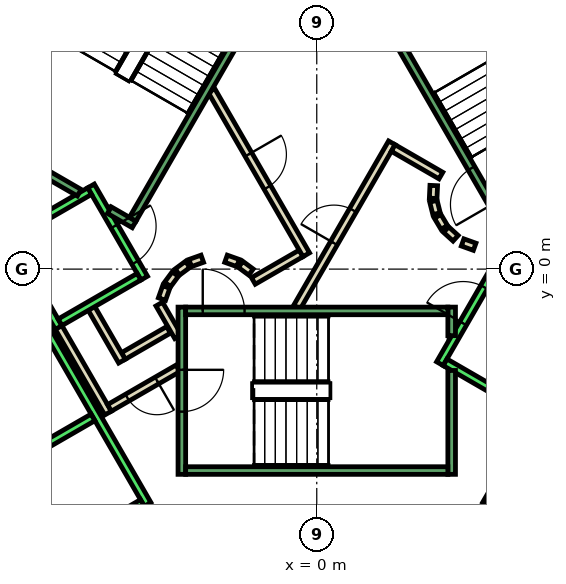
"""IFC4 building model, lengths in metres.
Left out: names, types, materials, properties, quantities, classifications, styles, units other than length and angle.
Written with IfcOpenShell. Run it as: python <this file> out.ifc"""

import sys

from ifc_helpers import new_model, si_unit, direction, frame, frame_2d, origin, place, context, subcontext, project, spatial, polyline, rectangle, outline, extrude, element, fill, save


model = new_model("IFC4")
c1 = context("Model", 3, precision=1e-05, world=origin(), true_north=direction((0.0, 1.0)))
c2 = subcontext(c1, "Body", "Model", "MODEL_VIEW")
j1 = project(units=[si_unit("LENGTHUNIT", "METRE"), si_unit("PLANEANGLEUNIT", "RADIAN")], contexts=[c1])
p1 = place(None, origin())
s1 = spatial("IfcSite", under=j1, at=p1, CompositionType="ELEMENT")
p2 = place(p1, origin())
s2 = spatial("IfcBuilding", under=s1, at=p2, CompositionType="ELEMENT")
p3 = place(p2, frame((0.0, 0.0, 81.2)))
s3 = spatial("IfcBuildingStorey", under=s2, at=p3, CompositionType="ELEMENT", Elevation=81.2)
p4 = place(p3, frame((0.0, 0.0, -0.6)))
e1 = element("IfcWall", 1, at=p4, inside=s3, PredefinedType="SHEAR", context=c2, shape_type="SweptSolid", body=[
    extrude(outline(polyline([(-12.267, 5.252), (-11.488, 4.802), (-6.409, 13.6), (-6.928, 14.5), (-12.267, 5.252)])), origin(), (0.0, 0.0, 1.0), 5.4),
])
p5 = place(p3, frame((0.0, 0.0, -0.6)))
e2 = element("IfcWall", 2, at=p5, inside=s3, PredefinedType="SHEAR", context=c2, shape_type="SweptSolid", body=[
    extrude(outline(polyline([(-13.856, 2.5), (-6.928, -9.5), (-6.409, -8.6), (-12.817, 2.5), (-13.856, 2.5)])), origin(), (0.0, 0.0, 1.0), 5.4),
])
p6 = place(p3, frame((-3.9, -1.599, 0.0), z_axis=(0.0, 0.0, 1.0), x_axis=(-0.865969445389, -0.500096910261, 0.0)))
e3 = element("IfcWall", 3, at=p6, inside=s3, PredefinedType="PARTITIONING", context=c2, shape_type="SweptSolid", body=[
    extrude(rectangle(XDim=1.373, YDim=0.2, at=frame_2d((0.687, 0.0))), origin(), (0.0, 0.0, 1.0), 4.8),
])
p7 = place(p3, frame((-5.126, -2.422, 0.0), z_axis=(0.0, 0.0, 1.0), x_axis=(-0.500062241894, 0.865989465428, 0.0)))
e4 = element("IfcWall", 4, at=p7, inside=s3, PredefinedType="PARTITIONING", context=c2, shape_type="SweptSolid", body=[
    extrude(rectangle(XDim=1.7, YDim=0.2, at=frame_2d((0.85, 0.0))), origin(), (0.0, 0.0, 1.0), 4.8),
])
p8 = place(p3, frame((-5.492, -3.788, 0.0), z_axis=(0.0, 0.0, 1.0), x_axis=(-0.500008949224, 0.866020236886, 0.0)))
e5 = element("IfcWall", 5, at=p8, inside=s3, PredefinedType="PARTITIONING", context=c2, shape_type="SweptSolid", body=[
    extrude(rectangle(XDim=2.68, YDim=0.2, at=frame_2d((1.34, 0.0))), origin(), (0.0, 0.0, 1.0), 4.8),
])
p9 = place(p3, frame((-4.145, -0.92, 0.0), z_axis=(0.0, 0.0, 1.0), x_axis=(0.499743786207, -0.866173278362, 0.0)))
e6 = element("IfcWall", 6, at=p9, inside=s3, PredefinedType="PARTITIONING", context=c2, shape_type="SweptSolid", body=[
    extrude(rectangle(XDim=0.991, YDim=0.2, at=frame_2d((0.495, 0.0))), origin(), (0.0, 0.0, 1.0), 4.8),
])
p10 = place(p3, frame((-3.65, -2.61, 0.0), z_axis=(0.0, 0.0, 1.0), x_axis=(-0.866072462134, -0.499918483688, 0.0)))
e7 = element("IfcWall", 7, at=p10, inside=s3, PredefinedType="PARTITIONING", context=c2, shape_type="SweptSolid", body=[
    extrude(rectangle(XDim=2.084, YDim=0.2, at=frame_2d((1.042, 0.0))), origin(), (0.0, 0.0, 1.0), 4.8),
])
p11 = place(p10, frame((0.642, 0.0, 0.0)))
e8 = element("IfcOpeningElement", 8, at=p11, cuts=e7, PredefinedType="OPENING", context=c2, shape_type="SweptSolid", body=[
    extrude(rectangle(XDim=0.9, YDim=2.1, at=frame_2d((0.45, 1.05))), frame((0.0, 0.11, 0.0), z_axis=(0.0, -1.0, 0.0), x_axis=(1.0, 0.0, 0.0)), (0.0, 0.0, 1.0), 0.22),
])
p12 = place(p3, frame((3.079, 2.199, 0.0), z_axis=(0.0, 0.0, 1.0), x_axis=(-0.047771483479, -0.998858290933, 0.0)))
e9 = element("IfcWall", 9, at=p12, inside=s3, PredefinedType="PARTITIONING", context=c2, shape_type="SweptSolid", body=[
    extrude(rectangle(XDim=0.337, YDim=0.2, at=frame_2d((0.169, 0.0))), origin(), (0.0, 0.0, 1.0), 4.8),
])
p13 = place(p3, frame((3.07, 1.786, 0.0), z_axis=(0.0, 0.0, 1.0), x_axis=(0.242705583207, -0.970099994784, 0.0)))
e10 = element("IfcWall", 10, at=p13, inside=s3, PredefinedType="PARTITIONING", context=c2, shape_type="SweptSolid", body=[
    extrude(rectangle(XDim=0.338, YDim=0.2, at=frame_2d((0.169, 0.0))), origin(), (0.0, 0.0, 1.0), 4.8),
])
for number, where, z_axis, x_axis in (
    (11, (3.182, 1.388, 0.0), (0.0, 0.0, 1.0), (0.512, -0.859, 0.0)),
    (12, (3.404, 1.039, 0.0), (0.0, 0.0, 1.0), (0.74, -0.672, 0.0)),
):
    element("IfcWall", number, at=place(p3, frame(where, z_axis=z_axis, x_axis=x_axis)), inside=s3, PredefinedType="PARTITIONING", context=c2, shape_type="SweptSolid", body=[
        extrude(rectangle(XDim=0.338, YDim=0.2, at=frame_2d((0.169, 0.0))), origin(), (0.0, 0.0, 1.0), 4.8),
    ])
p14 = place(p3, frame((3.838, 0.702, 0.0), z_axis=(0.0, 0.0, 1.0), x_axis=(0.941035081519, -0.338308993895, 0.0)))
e13 = element("IfcWall", 13, at=p14, inside=s3, PredefinedType="PARTITIONING", context=c2, shape_type="SweptSolid", body=[
    extrude(rectangle(XDim=0.337, YDim=0.2, at=frame_2d((0.168, 0.0))), origin(), (0.0, 0.0, 1.0), 4.8),
])
p15 = place(p3, frame((-0.52, -1.0, 0.0), z_axis=(0.0, 0.0, 1.0), x_axis=(0.50011622646, 0.865958290007, 0.0)))
e14 = element("IfcWall", 14, at=p15, inside=s3, PredefinedType="PARTITIONING", context=c2, shape_type="SweptSolid", body=[
    extrude(rectangle(XDim=4.991, YDim=0.2, at=frame_2d((2.496, 0.0))), origin(), (0.0, 0.0, 1.0), 4.8),
])
p16 = place(p15, frame((1.945, 0.0, 0.0)))
e15 = element("IfcOpeningElement", 15, at=p16, cuts=e14, PredefinedType="OPENING", context=c2, shape_type="SweptSolid", body=[
    extrude(rectangle(XDim=1.0, YDim=2.1, at=frame_2d((0.5, 1.05))), frame((0.0, 0.11, 0.0), z_axis=(0.0, -1.0, 0.0), x_axis=(1.0, 0.0, 0.0)), (0.0, 0.0, 1.0), 0.22),
])
p17 = place(p3, frame((2.012, 3.186, 0.0), z_axis=(0.0, 0.0, 1.0), x_axis=(0.865891012941, -0.500232699559, 0.0)))
e16 = element("IfcWall", 16, at=p17, inside=s3, PredefinedType="PARTITIONING", context=c2, shape_type="SweptSolid", body=[
    extrude(rectangle(XDim=1.449, YDim=0.2, at=frame_2d((0.725, 0.0))), origin(), (0.0, 0.0, 1.0), 4.8),
])
p18 = place(p3, frame((-0.412, 0.414, 0.0), z_axis=(0.0, 0.0, 1.0), x_axis=(-0.866017369001, -0.500013916395, 0.0)))
e17 = element("IfcWall", 17, at=p18, inside=s3, PredefinedType="PARTITIONING", context=c2, shape_type="SweptSolid", body=[
    extrude(rectangle(XDim=1.45, YDim=0.2, at=frame_2d((0.725, 0.0))), origin(), (0.0, 0.0, 1.0), 4.8),
])
p19 = place(p3, frame((-1.731, -0.077, 0.0), z_axis=(0.0, 0.0, 1.0), x_axis=(-0.804311165252, 0.594208338422, 0.0)))
e18 = element("IfcWall", 18, at=p19, inside=s3, PredefinedType="PARTITIONING", context=c2, shape_type="SweptSolid", body=[
    extrude(rectangle(XDim=0.338, YDim=0.2, at=frame_2d((0.169, 0.0))), origin(), (0.0, 0.0, 1.0), 4.8),
])
p20 = place(p3, frame((-2.07, 0.16, 0.0), z_axis=(0.0, 0.0, 1.0), x_axis=(-0.942199461132, 0.335052496547, 0.0)))
e19 = element("IfcWall", 19, at=p20, inside=s3, PredefinedType="PARTITIONING", context=c2, shape_type="SweptSolid", body=[
    extrude(rectangle(XDim=0.337, YDim=0.2, at=frame_2d((0.169, 0.0))), origin(), (0.0, 0.0, 1.0), 4.8),
])
p21 = place(p3, frame((-3.012, 0.273, 0.0), z_axis=(0.0, 0.0, 1.0), x_axis=(-0.942280615813, -0.334824194261, 0.0)))
e20 = element("IfcWall", 20, at=p21, inside=s3, PredefinedType="PARTITIONING", context=c2, shape_type="SweptSolid", body=[
    extrude(rectangle(XDim=0.338, YDim=0.2, at=frame_2d((0.169, 0.0))), origin(), (0.0, 0.0, 1.0), 4.8),
])
p22 = place(p3, frame((-3.397, 0.124, 0.0), z_axis=(0.0, 0.0, 1.0), x_axis=(-0.804311165252, -0.594208338422, 0.0)))
e21 = element("IfcWall", 21, at=p22, inside=s3, PredefinedType="PARTITIONING", context=c2, shape_type="SweptSolid", body=[
    extrude(rectangle(XDim=0.338, YDim=0.2, at=frame_2d((0.169, 0.0))), origin(), (0.0, 0.0, 1.0), 4.8),
])
p23 = place(p3, frame((-3.723, -0.131, 0.0), z_axis=(0.0, 0.0, 1.0), x_axis=(-0.594675113454, -0.803966112121, 0.0)))
e22 = element("IfcWall", 22, at=p23, inside=s3, PredefinedType="PARTITIONING", context=c2, shape_type="SweptSolid", body=[
    extrude(rectangle(XDim=0.338, YDim=0.2, at=frame_2d((0.169, 0.0))), origin(), (0.0, 0.0, 1.0), 4.8),
])
p24 = place(p3, frame((-3.96, -0.47, 0.0), z_axis=(0.0, 0.0, 1.0), x_axis=(-0.334824194261, -0.942280615813, 0.0)))
e23 = element("IfcWall", 23, at=p24, inside=s3, PredefinedType="PARTITIONING", context=c2, shape_type="SweptSolid", body=[
    extrude(rectangle(XDim=0.338, YDim=0.2, at=frame_2d((0.169, 0.0))), origin(), (0.0, 0.0, 1.0), 4.8),
])
p25 = place(p3, frame((-2.771, 4.7, 0.0), z_axis=(0.0, 0.0, 1.0), x_axis=(0.499969479948, -0.866043023828, 0.0)))
e24 = element("IfcWall", 24, at=p25, inside=s3, PredefinedType="PARTITIONING", context=c2, shape_type="SweptSolid", body=[
    extrude(rectangle(XDim=4.99, YDim=0.2, at=frame_2d((2.495, 0.0))), origin(), (0.0, 0.0, 1.0), 4.8),
])
p26 = place(p25, frame((1.945, 0.0, 0.0)))
e25 = element("IfcOpeningElement", 25, at=p26, cuts=e24, PredefinedType="OPENING", context=c2, shape_type="SweptSolid", body=[
    extrude(rectangle(XDim=1.0, YDim=2.1, at=frame_2d((0.5, 1.05))), frame((0.0, 0.11, 0.0), z_axis=(0.0, -1.0, 0.0), x_axis=(1.0, 0.0, 0.0)), (0.0, 0.0, 1.0), 0.22),
])
p27 = place(p3, frame((-5.94, 2.188, 0.0), z_axis=(0.0, 0.0, 1.0), x_axis=(0.49994636267, -0.866056369097, 0.0)))
e26 = element("IfcWall", 26, at=p27, inside=s3, PredefinedType="STANDARD", context=c2, shape_type="SweptSolid", body=[
    extrude(rectangle(XDim=2.8, YDim=0.2, at=frame_2d((1.4, 0.0))), origin(), (0.0, 0.0, 1.0), 4.8),
])
p28 = place(p27, frame((1.225, 0.0, 0.0)))
e27 = element("IfcOpeningElement", 27, at=p28, cuts=e26, PredefinedType="OPENING", context=c2, shape_type="SweptSolid", body=[
    extrude(rectangle(XDim=1.1, YDim=2.1, at=frame_2d((0.55, 1.05))), frame((0.0, 0.11, 0.0), z_axis=(0.0, -1.0, 0.0), x_axis=(1.0, 0.0, 0.0)), (0.0, 0.0, 1.0), 0.22),
])
p29 = place(p3, frame((-8.192, 0.888, 0.0), z_axis=(0.0, 0.0, 1.0), x_axis=(0.49994636267, -0.866056369097, 0.0)))
e28 = element("IfcWall", 28, at=p29, inside=s3, PredefinedType="STANDARD", context=c2, shape_type="SweptSolid", body=[
    extrude(rectangle(XDim=2.8, YDim=0.2, at=frame_2d((1.4, 0.0))), origin(), (0.0, 0.0, 1.0), 4.8),
])
for number, where, z_axis, x_axis in (
    (29, (-5.977, 2.052, 0.0), (0.0, 0.0, 1.0), (-0.866, -0.5, 0.0)),
    (30, (-4.677, -0.2, 0.0), (0.0, 0.0, 1.0), (-0.866, -0.5, 0.0)),
):
    element("IfcWall", number, at=place(p3, frame(where, z_axis=z_axis, x_axis=x_axis)), inside=s3, PredefinedType="STANDARD", context=c2, shape_type="SweptSolid", body=[
        extrude(rectangle(XDim=2.399, YDim=0.2, at=frame_2d((1.2, 0.0))), origin(), (0.0, 0.0, 1.0), 4.8),
    ])
p30 = place(p3, frame((-9.751, 2.99, 0.0), z_axis=(0.0, 0.0, 1.0), x_axis=(0.50000090737, -0.866024879913, 0.0)))
e31 = element("IfcWall", 31, at=p30, inside=s3, PredefinedType="STANDARD", context=c2, shape_type="SweptSolid", body=[
    extrude(rectangle(XDim=10.6, YDim=0.2, at=frame_2d((5.3, 0.0))), origin(), (0.0, 0.0, 1.0), 4.8),
])
for number, where, z_axis, x_axis in (
    (32, (-5.888, -3.902, 0.0), (0.0, 0.0, 1.0), (-0.866, -0.5, 0.0)),
    (33, (-4.588, -6.153, 0.0), (0.0, 0.0, 1.0), (-0.866, -0.5, 0.0)),
):
    element("IfcWall", number, at=place(p3, frame(where, z_axis=z_axis, x_axis=x_axis)), inside=s3, PredefinedType="STANDARD", context=c2, shape_type="SweptSolid", body=[
        extrude(rectangle(XDim=2.5, YDim=0.2, at=frame_2d((1.25, 0.0))), origin(), (0.0, 0.0, 1.0), 4.8),
    ])
p31 = place(p3, frame((3.24, -2.488, 0.0), z_axis=(0.0, 0.0, 1.0), x_axis=(0.49994636267, 0.866056369097, 0.0)))
e34 = element("IfcWall", 34, at=p31, inside=s3, PredefinedType="STANDARD", context=c2, shape_type="SweptSolid", body=[
    extrude(rectangle(XDim=2.8, YDim=0.2, at=frame_2d((1.4, 0.0))), origin(), (0.0, 0.0, 1.0), 4.8),
])
p32 = place(p31, frame((1.225, 0.0, 0.0)))
e35 = element("IfcOpeningElement", 35, at=p32, cuts=e34, PredefinedType="OPENING", context=c2, shape_type="SweptSolid", body=[
    extrude(rectangle(XDim=1.1, YDim=2.1, at=frame_2d((0.55, 1.05))), frame((0.0, 0.11, 0.0), z_axis=(0.0, -1.0, 0.0), x_axis=(1.0, 0.0, 0.0)), (0.0, 0.0, 1.0), 0.22),
])
p33 = place(p3, frame((3.377, -2.452, 0.0), z_axis=(0.0, 0.0, 1.0), x_axis=(0.865955154139, -0.50012165622, 0.0)))
e36 = element("IfcWall", 36, at=p33, inside=s3, PredefinedType="STANDARD", context=c2, shape_type="SweptSolid", body=[
    extrude(rectangle(XDim=2.4, YDim=0.2, at=frame_2d((1.2, 0.0))), origin(), (0.0, 0.0, 1.0), 4.8),
])
p34 = place(p3, frame((4.451, -6.19, 0.0), z_axis=(0.0, 0.0, 1.0), x_axis=(0.50000090737, 0.866024879913, 0.0)))
e37 = element("IfcWall", 37, at=p34, inside=s3, PredefinedType="STANDARD", context=c2, shape_type="SweptSolid", body=[
    extrude(rectangle(XDim=10.6, YDim=0.2, at=frame_2d((5.3, 0.0))), origin(), (0.0, 0.0, 1.0), 4.8),
])
p35 = place(p3, frame((-3.55, -1.0, 0.0), z_axis=(0.0, 0.0, 1.0), x_axis=(0.0, -1.0, 0.0)))
e38 = element("IfcWall", 38, at=p35, inside=s3, PredefinedType="STANDARD", context=c2, shape_type="SweptSolid", body=[
    extrude(rectangle(XDim=4.4, YDim=0.2, at=frame_2d((2.2, 0.0))), origin(), (0.0, 0.0, 1.0), 4.8),
])
p36 = place(p35, frame((1.65, 0.0, 0.0)))
e39 = element("IfcOpeningElement", 39, at=p36, cuts=e38, PredefinedType="OPENING", context=c2, shape_type="SweptSolid", body=[
    extrude(rectangle(XDim=1.1, YDim=2.2, at=frame_2d((0.55, 1.1))), frame((0.0, 0.11, 0.0), z_axis=(0.0, -1.0, 0.0), x_axis=(1.0, 0.0, 0.0)), (0.0, 0.0, 1.0), 0.22),
])
p37 = place(p3, frame((3.55, -2.667, 0.0), z_axis=(0.0, 0.0, 1.0), x_axis=(0.0, -1.0, 0.0)))
e40 = element("IfcWall", 40, at=p37, inside=s3, PredefinedType="STANDARD", context=c2, shape_type="SweptSolid", body=[
    extrude(rectangle(XDim=2.733, YDim=0.2, at=frame_2d((1.366, 0.0))), origin(), (0.0, 0.0, 1.0), 4.8),
])
p38 = place(p3, frame((3.55, -1.0, 0.0), z_axis=(0.0, 0.0, 1.0), x_axis=(0.0, -1.0, 0.0)))
e41 = element("IfcWall", 41, at=p38, inside=s3, PredefinedType="STANDARD", context=c2, shape_type="SweptSolid", body=[
    extrude(rectangle(XDim=0.751, YDim=0.2, at=frame_2d((0.375, 0.0))), origin(), (0.0, 0.0, 1.0), 4.8),
])
p39 = place(p3, frame((-3.45, -1.1, 0.0), z_axis=(0.0, 0.0, 1.0), x_axis=(1.0, 0.0, 0.0)))
e42 = element("IfcWall", 42, at=p39, inside=s3, PredefinedType="STANDARD", context=c2, shape_type="SweptSolid", body=[
    extrude(rectangle(XDim=6.9, YDim=0.2, at=frame_2d((3.45, 0.0))), origin(), (0.0, 0.0, 1.0), 4.8),
])
p40 = place(p39, frame((0.45, 0.0, 0.0)))
e43 = element("IfcOpeningElement", 43, at=p40, cuts=e42, PredefinedType="OPENING", context=c2, shape_type="SweptSolid", body=[
    extrude(rectangle(XDim=1.1, YDim=2.2, at=frame_2d((0.55, 1.1))), frame((0.0, 0.11, 0.0), z_axis=(0.0, -1.0, 0.0), x_axis=(1.0, 0.0, 0.0)), (0.0, 0.0, 1.0), 0.22),
])
p41 = place(p3, frame((-3.45, -5.3, 0.0), z_axis=(0.0, 0.0, 1.0), x_axis=(1.0, 0.0, 0.0)))
e44 = element("IfcWall", 44, at=p41, inside=s3, PredefinedType="STANDARD", context=c2, shape_type="SweptSolid", body=[
    extrude(rectangle(XDim=6.9, YDim=0.2, at=frame_2d((3.45, 0.0))), origin(), (0.0, 0.0, 1.0), 4.8),
])
p42 = place(p3, frame((4.843, 1.312, 0.0), z_axis=(0.0, 0.0, 1.0), x_axis=(-0.499963383562, 0.866046543262, 0.0)))
e45 = element("IfcWall", 45, at=p42, inside=s3, PredefinedType="STANDARD", context=c2, shape_type="SweptSolid", body=[
    extrude(rectangle(XDim=6.9, YDim=0.2, at=frame_2d((3.45, 0.0))), origin(), (0.0, 0.0, 1.0), 4.8),
])
p43 = place(p42, frame((0.45, 0.0, 0.0)))
e46 = element("IfcOpeningElement", 46, at=p43, cuts=e45, PredefinedType="OPENING", context=c2, shape_type="SweptSolid", body=[
    extrude(rectangle(XDim=1.1, YDim=2.2, at=frame_2d((0.55, 1.1))), frame((0.0, 0.11, 0.0), z_axis=(0.0, -1.0, 0.0), x_axis=(1.0, 0.0, 0.0)), (0.0, 0.0, 1.0), 0.22),
])
p44 = place(p3, frame((-6.25, 2.01, 0.0), z_axis=(0.0, 0.0, 1.0), x_axis=(-0.86611865017, 0.499838457731, 0.0)))
e47 = element("IfcWall", 47, at=p44, inside=s3, PredefinedType="STANDARD", context=c2, shape_type="SweptSolid", body=[
    extrude(rectangle(XDim=2.733, YDim=0.2, at=frame_2d((1.366, 0.0))), origin(), (0.0, 0.0, 1.0), 4.8),
])
p45 = place(p3, frame((-4.806, 1.176, 0.0), z_axis=(0.0, 0.0, 1.0), x_axis=(-0.866558586415, 0.499075361355, 0.0)))
e48 = element("IfcWall", 48, at=p45, inside=s3, PredefinedType="STANDARD", context=c2, shape_type="SweptSolid", body=[
    extrude(rectangle(XDim=0.751, YDim=0.2, at=frame_2d((0.376, 0.0))), origin(), (0.0, 0.0, 1.0), 4.8),
])
p46 = place(p3, frame((-1.393, 7.288, 0.0), z_axis=(0.0, 0.0, 1.0), x_axis=(-0.499963383562, -0.866046543262, 0.0)))
e49 = element("IfcWall", 49, at=p46, inside=s3, PredefinedType="STANDARD", context=c2, shape_type="SweptSolid", body=[
    extrude(rectangle(XDim=6.9, YDim=0.2, at=frame_2d((3.45, 0.0))), origin(), (0.0, 0.0, 1.0), 4.8),
])
p47 = place(p46, frame((0.45, 0.0, 0.0)))
e50 = element("IfcOpeningElement", 50, at=p47, cuts=e49, PredefinedType="OPENING", context=c2, shape_type="SweptSolid", body=[
    extrude(rectangle(XDim=1.1, YDim=2.2, at=frame_2d((0.55, 1.1))), frame((0.0, 0.11, 0.0), z_axis=(0.0, -1.0, 0.0), x_axis=(1.0, 0.0, 0.0)), (0.0, 0.0, 1.0), 0.22),
])
p48 = place(p3, frame((-5.03, 9.388, 0.0), z_axis=(0.0, 0.0, 1.0), x_axis=(-0.499978703459, -0.866037698999, 0.0)))
e51 = element("IfcWall", 51, at=p48, inside=s3, PredefinedType="STANDARD", context=c2, shape_type="SweptSolid", body=[
    extrude(rectangle(XDim=6.9, YDim=0.2, at=frame_2d((3.45, 0.0))), origin(), (0.0, 0.0, 1.0), 4.8),
])
p49 = place(p16, origin())
e52 = element("IfcDoor", 52, at=p49, inside=s3, OperationType="SINGLE_SWING_LEFT", PredefinedType="DOOR", context=c2, shape_type="SweptSolid", body=[
    extrude(rectangle(XDim=1.0, YDim=2.1, at=frame_2d((0.5, 1.05))), frame((0.0, 0.025, 0.0), z_axis=(0.0, -1.0, 0.0), x_axis=(1.0, 0.0, 0.0)), (0.0, 0.0, 1.0), 0.05),
])
fill(e15, e52)
p50 = place(p26, origin())
e53 = element("IfcDoor", 53, at=p50, inside=s3, OperationType="SINGLE_SWING_RIGHT", PredefinedType="DOOR", context=c2, shape_type="SweptSolid", body=[
    extrude(rectangle(XDim=1.0, YDim=2.1, at=frame_2d((0.5, 1.05))), frame((0.0, 0.025, 0.0), z_axis=(0.0, -1.0, 0.0), x_axis=(1.0, 0.0, 0.0)), (0.0, 0.0, 1.0), 0.05),
])
fill(e25, e53)
p51 = place(p11, origin())
e54 = element("IfcDoor", 54, at=p51, inside=s3, OperationType="SINGLE_SWING_LEFT", PredefinedType="DOOR", context=c2, shape_type="SweptSolid", body=[
    extrude(rectangle(XDim=0.9, YDim=2.1, at=frame_2d((0.45, 1.05))), frame((0.0, 0.025, 0.0), z_axis=(0.0, -1.0, 0.0), x_axis=(1.0, 0.0, 0.0)), (0.0, 0.0, 1.0), 0.05),
])
fill(e8, e54)
p52 = place(p32, origin())
e55 = element("IfcDoor", 55, at=p52, inside=s3, OperationType="SLIDING_TO_LEFT", PredefinedType="DOOR", context=c2, shape_type="SweptSolid", body=[
    extrude(rectangle(XDim=1.1, YDim=2.1, at=frame_2d((0.55, 1.05))), frame((0.0, 0.025, 0.0), z_axis=(0.0, -1.0, 0.0), x_axis=(1.0, 0.0, 0.0)), (0.0, 0.0, 1.0), 0.05),
])
fill(e35, e55)
p53 = place(p28, origin())
e56 = element("IfcDoor", 56, at=p53, inside=s3, OperationType="SLIDING_TO_LEFT", PredefinedType="DOOR", context=c2, shape_type="SweptSolid", body=[
    extrude(rectangle(XDim=1.1, YDim=2.1, at=frame_2d((0.55, 1.05))), frame((0.0, 0.025, 0.0), z_axis=(0.0, -1.0, 0.0), x_axis=(1.0, 0.0, 0.0)), (0.0, 0.0, 1.0), 0.05),
])
fill(e27, e56)
p54 = place(p40, origin())
e57 = element("IfcDoor", 57, at=p54, inside=s3, OperationType="SINGLE_SWING_LEFT", PredefinedType="DOOR", context=c2, shape_type="SweptSolid", body=[
    extrude(rectangle(XDim=1.1, YDim=2.2, at=frame_2d((0.55, 1.1))), frame((0.0, 0.025, 0.0), z_axis=(0.0, -1.0, 0.0), x_axis=(1.0, 0.0, 0.0)), (0.0, 0.0, 1.0), 0.05),
])
fill(e43, e57)
p55 = place(p36, origin())
e58 = element("IfcDoor", 58, at=p55, inside=s3, OperationType="SINGLE_SWING_LEFT", PredefinedType="DOOR", context=c2, shape_type="SweptSolid", body=[
    extrude(rectangle(XDim=1.1, YDim=2.2, at=frame_2d((0.55, 1.1))), frame((0.0, 0.025, 0.0), z_axis=(0.0, -1.0, 0.0), x_axis=(1.0, 0.0, 0.0)), (0.0, 0.0, 1.0), 0.05),
])
fill(e39, e58)
p56 = place(p43, origin())
e59 = element("IfcDoor", 59, at=p56, inside=s3, OperationType="SINGLE_SWING_LEFT", PredefinedType="DOOR", context=c2, shape_type="SweptSolid", body=[
    extrude(rectangle(XDim=1.1, YDim=2.2, at=frame_2d((0.55, 1.1))), frame((0.0, 0.025, 0.0), z_axis=(0.0, -1.0, 0.0), x_axis=(1.0, 0.0, 0.0)), (0.0, 0.0, 1.0), 0.05),
])
fill(e46, e59)
save(model, sys.argv[1])
